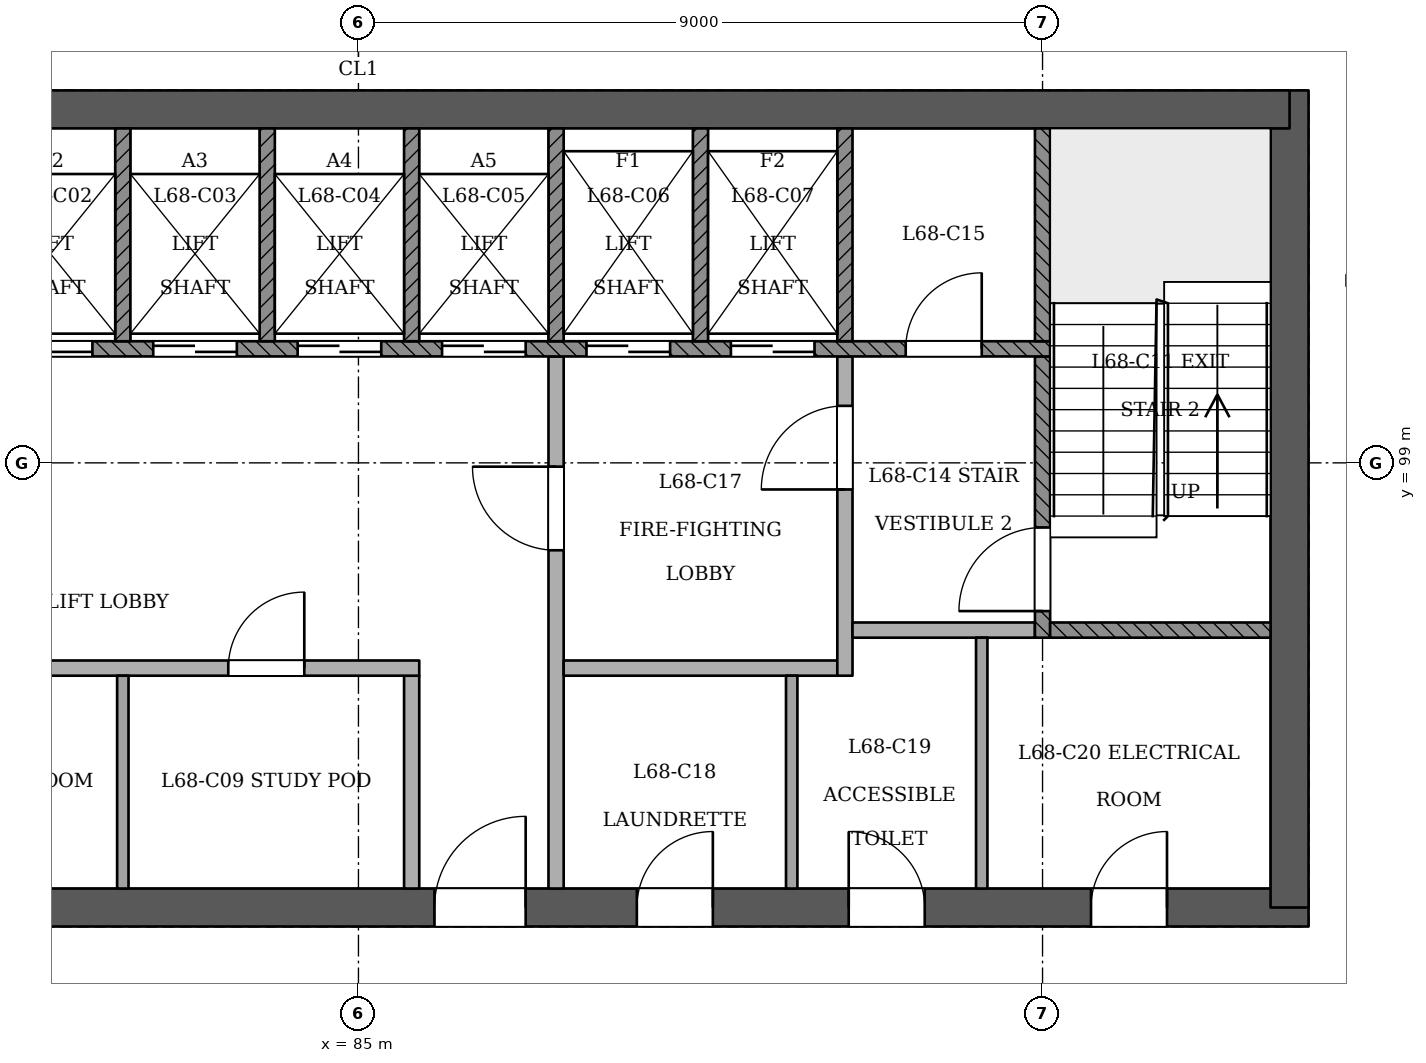
"""IFC4 building model, lengths in metres.
Left out: names, types, materials, properties, quantities, classifications, styles, units other than length and angle.
Written with IfcOpenShell. Run it as: python <this file> out.ifc"""

import sys

from ifc_helpers import new_model, si_unit, direction, frame, frame_2d, origin, place, context, subcontext, project, spatial, rectangle, extrude, element, fill, save


model = new_model("IFC4")
c1 = context("Model", 3, precision=1e-05, world=origin(), true_north=direction((0.0, 1.0)))
c2 = subcontext(c1, "Body", "Model", "MODEL_VIEW")
j1 = project(units=[si_unit("LENGTHUNIT", "METRE"), si_unit("PLANEANGLEUNIT", "RADIAN")], contexts=[c1])
p1 = place(None, origin())
s1 = spatial("IfcSite", under=j1, at=p1, CompositionType="ELEMENT")
p2 = place(p1, origin())
s2 = spatial("IfcBuilding", under=s1, at=p2, CompositionType="ELEMENT")
p3 = place(p2, frame((0.0, 0.0, 264.4)))
s3 = spatial("IfcBuildingStorey", under=s2, at=p3, CompositionType="ELEMENT", Elevation=264.4)
p4 = place(p3, frame((72.75, 93.15, 0.0), z_axis=(0.0, 0.0, 1.0), x_axis=(1.0, 0.0, 0.0)))
e1 = element("IfcWall", 1, at=p4, inside=s3, PredefinedType="SHEAR", context=c2, shape_type="SweptSolid", body=[
    extrude(rectangle(XDim=24.75, YDim=0.5, at=frame_2d((12.375, 0.0))), origin(), (0.0, 0.0, 1.0), 3.6),
])
p5 = place(p4, frame((1.05, 0.0, 0.0)))
e2 = element("IfcOpeningElement", 2, at=p5, cuts=e1, PredefinedType="OPENING", context=c2, shape_type="SweptSolid", body=[
    extrude(rectangle(XDim=1.2, YDim=2.1, at=frame_2d((0.6, 1.05))), frame((0.0, 0.26, 0.0), z_axis=(0.0, -1.0, 0.0), x_axis=(1.0, 0.0, 0.0)), (0.0, 0.0, 1.0), 0.521),
])
p6 = place(p4, frame((3.25, 0.0, 0.0)))
e3 = element("IfcOpeningElement", 3, at=p6, cuts=e1, PredefinedType="OPENING", context=c2, shape_type="SweptSolid", body=[
    extrude(rectangle(XDim=1.2, YDim=2.1, at=frame_2d((0.6, 1.05))), frame((0.0, 0.26, 0.0), z_axis=(0.0, -1.0, 0.0), x_axis=(1.0, 0.0, 0.0)), (0.0, 0.0, 1.0), 0.521),
])
p7 = place(p4, frame((13.25, 0.0, 0.0)))
e4 = element("IfcOpeningElement", 4, at=p7, cuts=e1, PredefinedType="OPENING", context=c2, shape_type="SweptSolid", body=[
    extrude(rectangle(XDim=1.2, YDim=2.1, at=frame_2d((0.6, 1.05))), frame((0.0, 0.26, 0.0), z_axis=(0.0, -1.0, 0.0), x_axis=(1.0, 0.0, 0.0)), (0.0, 0.0, 1.0), 0.521),
])
p8 = place(p4, frame((15.913, 0.0, 0.0)))
e5 = element("IfcOpeningElement", 5, at=p8, cuts=e1, PredefinedType="OPENING", context=c2, shape_type="SweptSolid", body=[
    extrude(rectangle(XDim=1.0, YDim=2.1, at=frame_2d((0.5, 1.05))), frame((0.0, 0.26, 0.0), z_axis=(0.0, -1.0, 0.0), x_axis=(1.0, 0.0, 0.0)), (0.0, 0.0, 1.0), 0.521),
])
p9 = place(p4, frame((18.7, 0.0, 0.0)))
e6 = element("IfcOpeningElement", 6, at=p9, cuts=e1, PredefinedType="OPENING", context=c2, shape_type="SweptSolid", body=[
    extrude(rectangle(XDim=1.0, YDim=2.1, at=frame_2d((0.5, 1.05))), frame((0.0, 0.26, 0.0), z_axis=(0.0, -1.0, 0.0), x_axis=(1.0, 0.0, 0.0)), (0.0, 0.0, 1.0), 0.521),
])
p10 = place(p4, frame((21.887, 0.0, 0.0)))
e7 = element("IfcOpeningElement", 7, at=p10, cuts=e1, PredefinedType="OPENING", context=c2, shape_type="SweptSolid", body=[
    extrude(rectangle(XDim=1.0, YDim=2.1, at=frame_2d((0.5, 1.05))), frame((0.0, 0.26, 0.0), z_axis=(0.0, -1.0, 0.0), x_axis=(1.0, 0.0, 0.0)), (0.0, 0.0, 1.0), 0.521),
])
p11 = place(p3, frame((97.25, 93.15, 0.0), z_axis=(0.0, 0.0, 1.0), x_axis=(0.0, 1.0, 0.0)))
e8 = element("IfcWall", 8, at=p11, inside=s3, PredefinedType="SHEAR", context=c2, shape_type="SweptSolid", body=[
    extrude(rectangle(XDim=10.75, YDim=0.5, at=frame_2d((5.375, 0.0))), origin(), (0.0, 0.0, 1.0), 3.6),
])
p12 = place(p3, frame((97.25, 103.65, 0.0), z_axis=(0.0, 0.0, 1.0), x_axis=(-1.0, 0.0, 0.0)))
e9 = element("IfcWall", 9, at=p12, inside=s3, PredefinedType="SHEAR", context=c2, shape_type="SweptSolid", body=[
    extrude(rectangle(XDim=24.75, YDim=0.5, at=frame_2d((12.375, 0.0))), origin(), (0.0, 0.0, 1.0), 3.6),
])
p13 = place(p3, frame((81.9, 93.4, 0.0), z_axis=(0.0, 0.0, 1.0), x_axis=(0.0, 1.0, 0.0)))
e10 = element("IfcWall", 10, at=p13, inside=s3, PredefinedType="PARTITIONING", context=c2, shape_type="SweptSolid", body=[
    extrude(rectangle(XDim=2.8, YDim=0.15, at=frame_2d((1.4, 0.0))), origin(), (0.0, 0.0, 1.0), 3.2),
])
p14 = place(p3, frame((85.7, 93.4, 0.0), z_axis=(0.0, 0.0, 1.0), x_axis=(0.0, 1.0, 0.0)))
e11 = element("IfcWall", 11, at=p14, inside=s3, PredefinedType="PARTITIONING", context=c2, shape_type="SweptSolid", body=[
    extrude(rectangle(XDim=2.8, YDim=0.2, at=frame_2d((1.4, 0.0))), origin(), (0.0, 0.0, 1.0), 3.2),
])
p15 = place(p3, frame((87.6, 93.4, 0.0), z_axis=(0.0, 0.0, 1.0), x_axis=(0.0, 1.0, 0.0)))
e12 = element("IfcWall", 12, at=p15, inside=s3, PredefinedType="PARTITIONING", context=c2, shape_type="SweptSolid", body=[
    extrude(rectangle(XDim=7.0, YDim=0.2, at=frame_2d((3.5, 0.0))), origin(), (0.0, 0.0, 1.0), 3.2),
])
p16 = place(p15, frame((4.45, 0.0, 0.0)))
e13 = element("IfcOpeningElement", 13, at=p16, cuts=e12, PredefinedType="OPENING", context=c2, shape_type="SweptSolid", body=[
    extrude(rectangle(XDim=1.1, YDim=2.1, at=frame_2d((0.55, 1.05))), frame((0.0, 0.11, 0.0), z_axis=(0.0, -1.0, 0.0), x_axis=(1.0, 0.0, 0.0)), (0.0, 0.0, 1.0), 0.221),
])
p17 = place(p3, frame((90.7, 93.4, 0.0), z_axis=(0.0, 0.0, 1.0), x_axis=(0.0, 1.0, 0.0)))
e14 = element("IfcWall", 14, at=p17, inside=s3, PredefinedType="PARTITIONING", context=c2, shape_type="SweptSolid", body=[
    extrude(rectangle(XDim=2.8, YDim=0.15, at=frame_2d((1.4, 0.0))), origin(), (0.0, 0.0, 1.0), 3.2),
])
p18 = place(p3, frame((93.2, 93.4, 0.0), z_axis=(0.0, 0.0, 1.0), x_axis=(0.0, 1.0, 0.0)))
e15 = element("IfcWall", 15, at=p18, inside=s3, PredefinedType="PARTITIONING", context=c2, shape_type="SweptSolid", body=[
    extrude(rectangle(XDim=3.3, YDim=0.15, at=frame_2d((1.65, 0.0))), origin(), (0.0, 0.0, 1.0), 3.2),
])
p19 = place(p3, frame((78.0, 96.3, 0.0), z_axis=(0.0, 0.0, 1.0), x_axis=(1.0, 0.0, 0.0)))
e16 = element("IfcWall", 16, at=p19, inside=s3, PredefinedType="PARTITIONING", context=c2, shape_type="SweptSolid", body=[
    extrude(rectangle(XDim=7.8, YDim=0.2, at=frame_2d((3.9, 0.0))), origin(), (0.0, 0.0, 1.0), 3.2),
])
p20 = place(p19, frame((1.512, 0.0, 0.0)))
e17 = element("IfcOpeningElement", 17, at=p20, cuts=e16, PredefinedType="OPENING", context=c2, shape_type="SweptSolid", body=[
    extrude(rectangle(XDim=1.0, YDim=2.1, at=frame_2d((0.5, 1.05))), frame((0.0, 0.11, 0.0), z_axis=(0.0, -1.0, 0.0), x_axis=(1.0, 0.0, 0.0)), (0.0, 0.0, 1.0), 0.221),
])
p21 = place(p19, frame((5.288, 0.0, 0.0)))
e18 = element("IfcOpeningElement", 18, at=p21, cuts=e16, PredefinedType="OPENING", context=c2, shape_type="SweptSolid", body=[
    extrude(rectangle(XDim=1.0, YDim=2.1, at=frame_2d((0.5, 1.05))), frame((0.0, 0.11, 0.0), z_axis=(0.0, -1.0, 0.0), x_axis=(1.0, 0.0, 0.0)), (0.0, 0.0, 1.0), 0.221),
])
p22 = place(p3, frame((87.7, 96.3, 0.0), z_axis=(0.0, 0.0, 1.0), x_axis=(1.0, 0.0, 0.0)))
e19 = element("IfcWall", 19, at=p22, inside=s3, PredefinedType="PARTITIONING", context=c2, shape_type="SweptSolid", body=[
    extrude(rectangle(XDim=3.6, YDim=0.2, at=frame_2d((1.8, 0.0))), origin(), (0.0, 0.0, 1.0), 3.2),
])
p23 = place(p3, frame((91.4, 96.2, 0.0), z_axis=(0.0, 0.0, 1.0), x_axis=(0.0, 1.0, 0.0)))
e20 = element("IfcWall", 20, at=p23, inside=s3, PredefinedType="PARTITIONING", context=c2, shape_type="SweptSolid", body=[
    extrude(rectangle(XDim=4.2, YDim=0.2, at=frame_2d((2.1, 0.0))), origin(), (0.0, 0.0, 1.0), 3.2),
])
p24 = place(p23, frame((2.45, 0.0, 0.0)))
e21 = element("IfcOpeningElement", 21, at=p24, cuts=e20, PredefinedType="OPENING", context=c2, shape_type="SweptSolid", body=[
    extrude(rectangle(XDim=1.1, YDim=2.1, at=frame_2d((0.55, 1.05))), frame((0.0, 0.11, 0.0), z_axis=(0.0, -1.0, 0.0), x_axis=(1.0, 0.0, 0.0)), (0.0, 0.0, 1.0), 0.221),
])
p25 = place(p3, frame((91.5, 96.8, 0.0), z_axis=(0.0, 0.0, 1.0), x_axis=(1.0, 0.0, 0.0)))
e22 = element("IfcWall", 22, at=p25, inside=s3, PredefinedType="PARTITIONING", context=c2, shape_type="SweptSolid", body=[
    extrude(rectangle(XDim=2.4, YDim=0.2, at=frame_2d((1.2, 0.0))), origin(), (0.0, 0.0, 1.0), 3.2),
])
p26 = place(p3, frame((94.0, 96.7, 0.0), z_axis=(0.0, 0.0, 1.0), x_axis=(0.0, 1.0, 0.0)))
e23 = element("IfcWall", 23, at=p26, inside=s3, PredefinedType="SOLIDWALL", context=c2, shape_type="SweptSolid", body=[
    extrude(rectangle(XDim=3.7, YDim=0.2, at=frame_2d((1.85, 0.0))), origin(), (0.0, 0.0, 1.0), 3.2),
])
p27 = place(p26, frame((0.35, 0.0, 0.0)))
e24 = element("IfcOpeningElement", 24, at=p27, cuts=e23, PredefinedType="OPENING", context=c2, shape_type="SweptSolid", body=[
    extrude(rectangle(XDim=1.1, YDim=2.1, at=frame_2d((0.55, 1.05))), frame((0.0, 0.11, 0.0), z_axis=(0.0, -1.0, 0.0), x_axis=(1.0, 0.0, 0.0)), (0.0, 0.0, 1.0), 0.221),
])
p28 = place(p3, frame((94.1, 96.8, 0.0), z_axis=(0.0, 0.0, 1.0), x_axis=(1.0, 0.0, 0.0)))
e25 = element("IfcWall", 25, at=p28, inside=s3, PredefinedType="SOLIDWALL", context=c2, shape_type="SweptSolid", body=[
    extrude(rectangle(XDim=2.9, YDim=0.2, at=frame_2d((1.45, 0.0))), origin(), (0.0, 0.0, 1.0), 3.2),
])
p29 = place(p3, frame((75.9, 100.5, 0.0), z_axis=(0.0, 0.0, 1.0), x_axis=(1.0, 0.0, 0.0)))
e26 = element("IfcWall", 26, at=p29, inside=s3, PredefinedType="SOLIDWALL", context=c2, shape_type="SweptSolid", body=[
    extrude(rectangle(XDim=18.2, YDim=0.2, at=frame_2d((9.1, 0.0))), origin(), (0.0, 0.0, 1.0), 3.2),
])
p30 = place(p29, frame((2.6, 0.0, 0.0)))
e27 = element("IfcOpeningElement", 27, at=p30, cuts=e26, PredefinedType="OPENING", context=c2, shape_type="SweptSolid", body=[
    extrude(rectangle(XDim=1.1, YDim=2.1, at=frame_2d((0.55, 1.05))), frame((0.0, 0.11, 0.0), z_axis=(0.0, -1.0, 0.0), x_axis=(1.0, 0.0, 0.0)), (0.0, 0.0, 1.0), 0.221),
])
p31 = place(p29, frame((4.5, 0.0, 0.0)))
e28 = element("IfcOpeningElement", 28, at=p31, cuts=e26, PredefinedType="OPENING", context=c2, shape_type="SweptSolid", body=[
    extrude(rectangle(XDim=1.1, YDim=2.1, at=frame_2d((0.55, 1.05))), frame((0.0, 0.11, 0.0), z_axis=(0.0, -1.0, 0.0), x_axis=(1.0, 0.0, 0.0)), (0.0, 0.0, 1.0), 0.221),
])
p32 = place(p29, frame((6.4, 0.0, 0.0)))
e29 = element("IfcOpeningElement", 29, at=p32, cuts=e26, PredefinedType="OPENING", context=c2, shape_type="SweptSolid", body=[
    extrude(rectangle(XDim=1.1, YDim=2.1, at=frame_2d((0.55, 1.05))), frame((0.0, 0.11, 0.0), z_axis=(0.0, -1.0, 0.0), x_axis=(1.0, 0.0, 0.0)), (0.0, 0.0, 1.0), 0.221),
])
p33 = place(p29, frame((8.3, 0.0, 0.0)))
e30 = element("IfcOpeningElement", 30, at=p33, cuts=e26, PredefinedType="OPENING", context=c2, shape_type="SweptSolid", body=[
    extrude(rectangle(XDim=1.1, YDim=2.1, at=frame_2d((0.55, 1.05))), frame((0.0, 0.11, 0.0), z_axis=(0.0, -1.0, 0.0), x_axis=(1.0, 0.0, 0.0)), (0.0, 0.0, 1.0), 0.221),
])
p34 = place(p29, frame((10.2, 0.0, 0.0)))
e31 = element("IfcOpeningElement", 31, at=p34, cuts=e26, PredefinedType="OPENING", context=c2, shape_type="SweptSolid", body=[
    extrude(rectangle(XDim=1.1, YDim=2.1, at=frame_2d((0.55, 1.05))), frame((0.0, 0.11, 0.0), z_axis=(0.0, -1.0, 0.0), x_axis=(1.0, 0.0, 0.0)), (0.0, 0.0, 1.0), 0.221),
])
p35 = place(p29, frame((12.1, 0.0, 0.0)))
e32 = element("IfcOpeningElement", 32, at=p35, cuts=e26, PredefinedType="OPENING", context=c2, shape_type="SweptSolid", body=[
    extrude(rectangle(XDim=1.1, YDim=2.1, at=frame_2d((0.55, 1.05))), frame((0.0, 0.11, 0.0), z_axis=(0.0, -1.0, 0.0), x_axis=(1.0, 0.0, 0.0)), (0.0, 0.0, 1.0), 0.221),
])
p36 = place(p29, frame((14.0, 0.0, 0.0)))
e33 = element("IfcOpeningElement", 33, at=p36, cuts=e26, PredefinedType="OPENING", context=c2, shape_type="SweptSolid", body=[
    extrude(rectangle(XDim=1.1, YDim=2.1, at=frame_2d((0.55, 1.05))), frame((0.0, 0.11, 0.0), z_axis=(0.0, -1.0, 0.0), x_axis=(1.0, 0.0, 0.0)), (0.0, 0.0, 1.0), 0.221),
])
p37 = place(p29, frame((0.65, 0.0, 0.0)))
e34 = element("IfcOpeningElement", 34, at=p37, cuts=e26, PredefinedType="OPENING", context=c2, shape_type="SweptSolid", body=[
    extrude(rectangle(XDim=1.0, YDim=2.1, at=frame_2d((0.5, 1.05))), frame((0.0, 0.11, 0.0), z_axis=(0.0, -1.0, 0.0), x_axis=(1.0, 0.0, 0.0)), (0.0, 0.0, 1.0), 0.221),
])
p38 = place(p29, frame((16.3, 0.0, 0.0)))
e35 = element("IfcOpeningElement", 35, at=p38, cuts=e26, PredefinedType="OPENING", context=c2, shape_type="SweptSolid", body=[
    extrude(rectangle(XDim=1.0, YDim=2.1, at=frame_2d((0.5, 1.05))), frame((0.0, 0.11, 0.0), z_axis=(0.0, -1.0, 0.0), x_axis=(1.0, 0.0, 0.0)), (0.0, 0.0, 1.0), 0.221),
])
for number, where, z_axis, x_axis in (
    (36, (81.9, 100.6, 0.0), (0.0, 0.0, 1.0), (0.0, 1.0, 0.0)),
    (37, (83.8, 100.6, 0.0), (0.0, 0.0, 1.0), (0.0, 1.0, 0.0)),
    (38, (85.7, 100.6, 0.0), (0.0, 0.0, 1.0), (0.0, 1.0, 0.0)),
    (39, (87.6, 100.6, 0.0), (0.0, 0.0, 1.0), (0.0, 1.0, 0.0)),
    (40, (89.5, 100.6, 0.0), (0.0, 0.0, 1.0), (0.0, 1.0, 0.0)),
    (41, (91.4, 100.6, 0.0), (0.0, 0.0, 1.0), (0.0, 1.0, 0.0)),
    (42, (94.0, 100.6, 0.0), (0.0, 0.0, 1.0), (0.0, 1.0, 0.0)),
):
    element("IfcWall", number, at=place(p3, frame(where, z_axis=z_axis, x_axis=x_axis)), inside=s3, PredefinedType="SOLIDWALL", context=c2, shape_type="SweptSolid", body=[
        extrude(rectangle(XDim=2.8, YDim=0.2, at=frame_2d((1.4, 0.0))), origin(), (0.0, 0.0, 1.0), 3.2),
    ])
p39 = place(p31, origin())
e43 = element("IfcDoor", 43, at=p39, inside=s3, OperationType="SLIDING_TO_LEFT", PredefinedType="NOTDEFINED", context=c2, shape_type="SweptSolid", body=[
    extrude(rectangle(XDim=1.1, YDim=2.1, at=frame_2d((0.55, 1.05))), frame((0.0, 0.025, 0.0), z_axis=(0.0, -1.0, 0.0), x_axis=(1.0, 0.0, 0.0)), (0.0, 0.0, 1.0), 0.05),
])
fill(e28, e43)
p40 = place(p32, origin())
e44 = element("IfcDoor", 44, at=p40, inside=s3, OperationType="SLIDING_TO_RIGHT", PredefinedType="NOTDEFINED", context=c2, shape_type="SweptSolid", body=[
    extrude(rectangle(XDim=1.1, YDim=2.1, at=frame_2d((0.55, 1.05))), frame((0.0, 0.025, 0.0), z_axis=(0.0, -1.0, 0.0), x_axis=(1.0, 0.0, 0.0)), (0.0, 0.0, 1.0), 0.05),
])
fill(e29, e44)
p41 = place(p33, origin())
e45 = element("IfcDoor", 45, at=p41, inside=s3, OperationType="SLIDING_TO_LEFT", PredefinedType="NOTDEFINED", context=c2, shape_type="SweptSolid", body=[
    extrude(rectangle(XDim=1.1, YDim=2.1, at=frame_2d((0.55, 1.05))), frame((0.0, 0.025, 0.0), z_axis=(0.0, -1.0, 0.0), x_axis=(1.0, 0.0, 0.0)), (0.0, 0.0, 1.0), 0.05),
])
fill(e30, e45)
p42 = place(p34, origin())
e46 = element("IfcDoor", 46, at=p42, inside=s3, OperationType="SLIDING_TO_RIGHT", PredefinedType="NOTDEFINED", context=c2, shape_type="SweptSolid", body=[
    extrude(rectangle(XDim=1.1, YDim=2.1, at=frame_2d((0.55, 1.05))), frame((0.0, 0.025, 0.0), z_axis=(0.0, -1.0, 0.0), x_axis=(1.0, 0.0, 0.0)), (0.0, 0.0, 1.0), 0.05),
])
fill(e31, e46)
p43 = place(p35, origin())
e47 = element("IfcDoor", 47, at=p43, inside=s3, OperationType="SLIDING_TO_RIGHT", PredefinedType="NOTDEFINED", context=c2, shape_type="SweptSolid", body=[
    extrude(rectangle(XDim=1.1, YDim=2.1, at=frame_2d((0.55, 1.05))), frame((0.0, 0.025, 0.0), z_axis=(0.0, -1.0, 0.0), x_axis=(1.0, 0.0, 0.0)), (0.0, 0.0, 1.0), 0.05),
])
fill(e32, e47)
p44 = place(p36, origin())
e48 = element("IfcDoor", 48, at=p44, inside=s3, OperationType="SLIDING_TO_LEFT", PredefinedType="NOTDEFINED", context=c2, shape_type="SweptSolid", body=[
    extrude(rectangle(XDim=1.1, YDim=2.1, at=frame_2d((0.55, 1.05))), frame((0.0, 0.025, 0.0), z_axis=(0.0, -1.0, 0.0), x_axis=(1.0, 0.0, 0.0)), (0.0, 0.0, 1.0), 0.05),
])
fill(e33, e48)
p45 = place(p27, origin())
e49 = element("IfcDoor", 49, at=p45, inside=s3, OperationType="SINGLE_SWING_LEFT", PredefinedType="NOTDEFINED", context=c2, shape_type="SweptSolid", body=[
    extrude(rectangle(XDim=1.1, YDim=2.1, at=frame_2d((0.55, 1.05))), frame((0.0, 0.025, 0.0), z_axis=(0.0, -1.0, 0.0), x_axis=(1.0, 0.0, 0.0)), (0.0, 0.0, 1.0), 0.05),
])
fill(e24, e49)
p46 = place(p16, origin())
e50 = element("IfcDoor", 50, at=p46, inside=s3, OperationType="SINGLE_SWING_RIGHT", PredefinedType="NOTDEFINED", context=c2, shape_type="SweptSolid", body=[
    extrude(rectangle(XDim=1.1, YDim=2.1, at=frame_2d((0.55, 1.05))), frame((0.0, 0.025, 0.0), z_axis=(0.0, -1.0, 0.0), x_axis=(1.0, 0.0, 0.0)), (0.0, 0.0, 1.0), 0.05),
])
fill(e13, e50)
p47 = place(p24, origin())
e51 = element("IfcDoor", 51, at=p47, inside=s3, OperationType="SINGLE_SWING_LEFT", PredefinedType="NOTDEFINED", context=c2, shape_type="SweptSolid", body=[
    extrude(rectangle(XDim=1.1, YDim=2.1, at=frame_2d((0.55, 1.05))), frame((0.0, 0.025, 0.0), z_axis=(0.0, -1.0, 0.0), x_axis=(1.0, 0.0, 0.0)), (0.0, 0.0, 1.0), 0.05),
])
fill(e21, e51)
p48 = place(p7, origin())
e52 = element("IfcDoor", 52, at=p48, inside=s3, OperationType="SINGLE_SWING_RIGHT", PredefinedType="NOTDEFINED", context=c2, shape_type="SweptSolid", body=[
    extrude(rectangle(XDim=1.2, YDim=2.1, at=frame_2d((0.6, 1.05))), frame((0.0, 0.025, 0.0), z_axis=(0.0, -1.0, 0.0), x_axis=(1.0, 0.0, 0.0)), (0.0, 0.0, 1.0), 0.05),
])
fill(e4, e52)
p49 = place(p38, origin())
e53 = element("IfcDoor", 53, at=p49, inside=s3, OperationType="SINGLE_SWING_RIGHT", PredefinedType="NOTDEFINED", context=c2, shape_type="SweptSolid", body=[
    extrude(rectangle(XDim=1.0, YDim=2.1, at=frame_2d((0.5, 1.05))), frame((0.0, 0.025, 0.0), z_axis=(0.0, -1.0, 0.0), x_axis=(1.0, 0.0, 0.0)), (0.0, 0.0, 1.0), 0.05),
])
fill(e35, e53)
p50 = place(p8, origin())
e54 = element("IfcDoor", 54, at=p50, inside=s3, OperationType="SINGLE_SWING_RIGHT", PredefinedType="NOTDEFINED", context=c2, shape_type="SweptSolid", body=[
    extrude(rectangle(XDim=1.0, YDim=2.1, at=frame_2d((0.5, 1.05))), frame((0.0, 0.025, 0.0), z_axis=(0.0, -1.0, 0.0), x_axis=(1.0, 0.0, 0.0)), (0.0, 0.0, 1.0), 0.05),
])
fill(e5, e54)
p51 = place(p9, origin())
e55 = element("IfcDoor", 55, at=p51, inside=s3, OperationType="SINGLE_SWING_LEFT", PredefinedType="NOTDEFINED", context=c2, shape_type="SweptSolid", body=[
    extrude(rectangle(XDim=1.0, YDim=2.1, at=frame_2d((0.5, 1.05))), frame((0.0, 0.025, 0.0), z_axis=(0.0, -1.0, 0.0), x_axis=(1.0, 0.0, 0.0)), (0.0, 0.0, 1.0), 0.05),
])
fill(e6, e55)
p52 = place(p10, origin())
e56 = element("IfcDoor", 56, at=p52, inside=s3, OperationType="SINGLE_SWING_RIGHT", PredefinedType="NOTDEFINED", context=c2, shape_type="SweptSolid", body=[
    extrude(rectangle(XDim=1.0, YDim=2.1, at=frame_2d((0.5, 1.05))), frame((0.0, 0.025, 0.0), z_axis=(0.0, -1.0, 0.0), x_axis=(1.0, 0.0, 0.0)), (0.0, 0.0, 1.0), 0.05),
])
fill(e7, e56)
p53 = place(p21, origin())
e57 = element("IfcDoor", 57, at=p53, inside=s3, OperationType="SINGLE_SWING_RIGHT", PredefinedType="NOTDEFINED", context=c2, shape_type="SweptSolid", body=[
    extrude(rectangle(XDim=1.0, YDim=2.1, at=frame_2d((0.5, 1.05))), frame((0.0, 0.025, 0.0), z_axis=(0.0, -1.0, 0.0), x_axis=(1.0, 0.0, 0.0)), (0.0, 0.0, 1.0), 0.05),
])
fill(e18, e57)
save(model, sys.argv[1])
